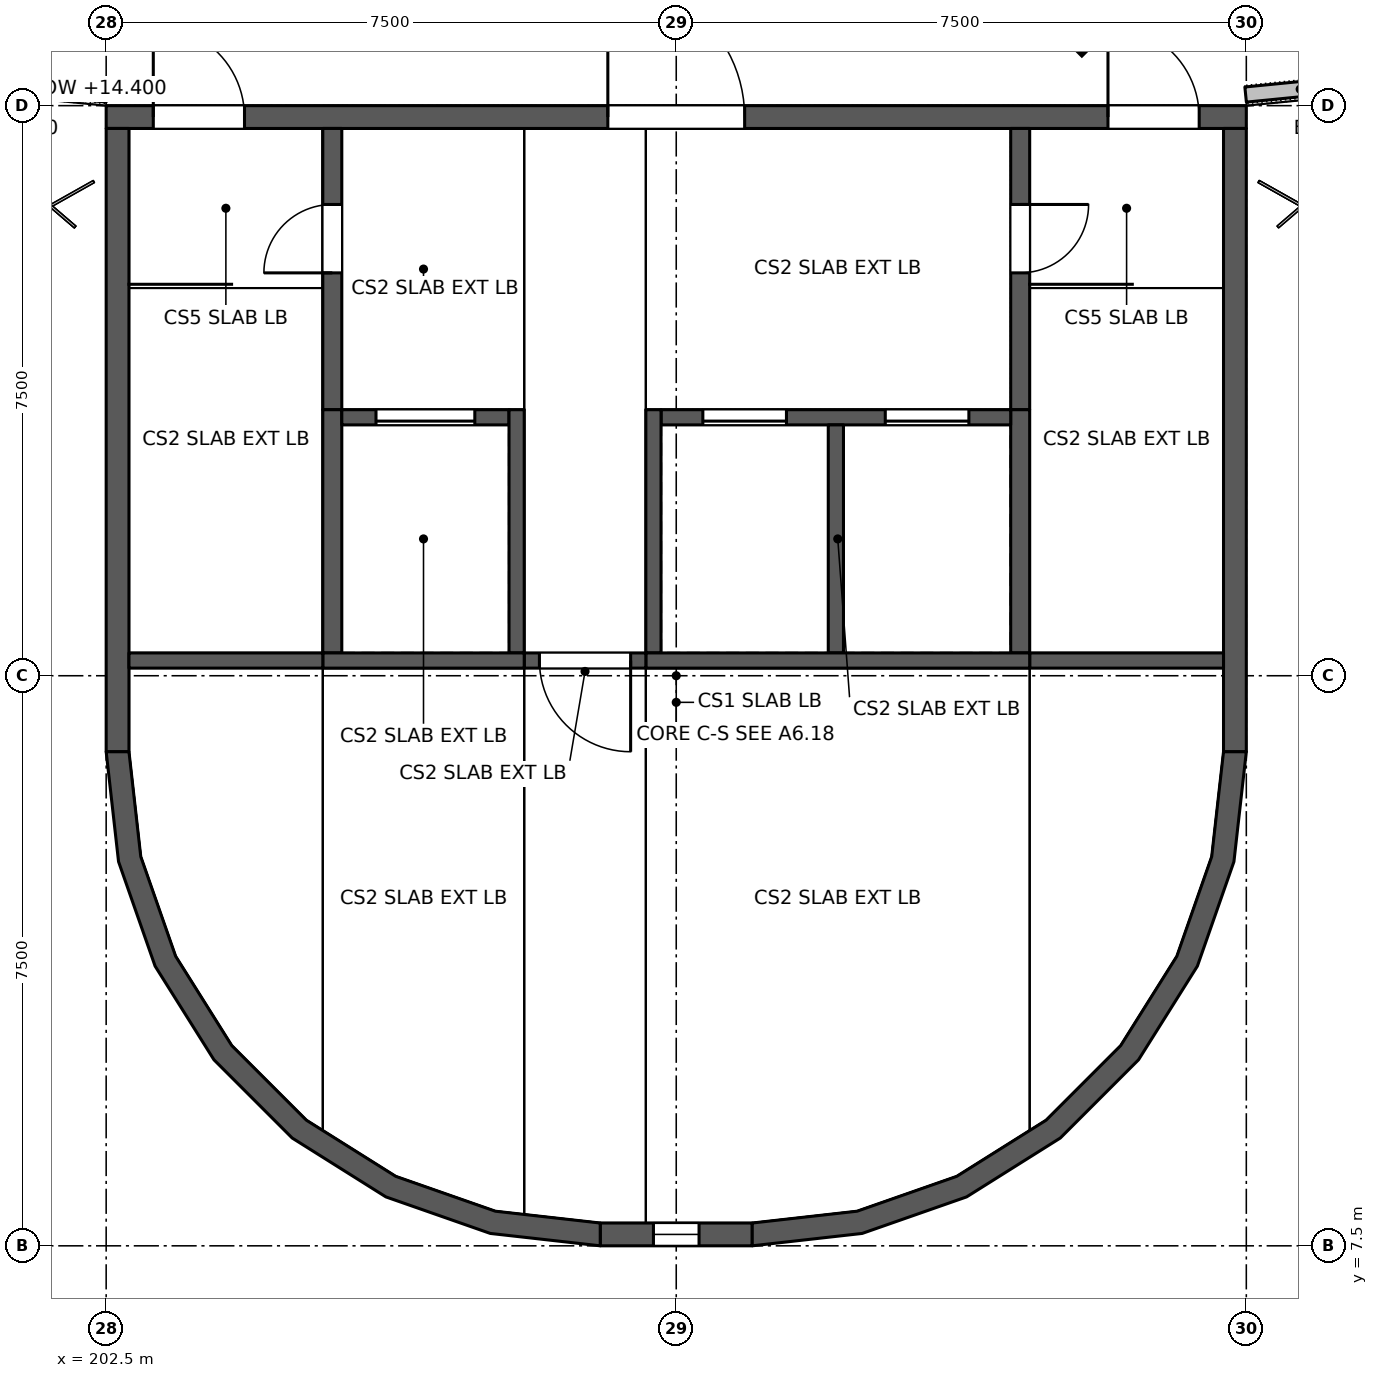
"""IFC4 building model, lengths in metres.
Left out: names, types, materials, properties, quantities, classifications, styles, units other than length and angle.
Written with IfcOpenShell. Run it as: python <this file> out.ifc"""

import sys

from ifc_helpers import new_model, si_unit, direction, frame, frame_2d, origin, place, context, subcontext, project, spatial, polyline, rectangle, outline, extrude, element, fill, save


model = new_model("IFC4")
c1 = context("Model", 3, precision=1e-05, world=origin(), true_north=direction((0.0, 1.0)))
c2 = subcontext(c1, "Body", "Model", "MODEL_VIEW")
j1 = project(units=[si_unit("LENGTHUNIT", "METRE"), si_unit("PLANEANGLEUNIT", "RADIAN")], contexts=[c1])
p1 = place(None, origin())
s1 = spatial("IfcSite", under=j1, at=p1, CompositionType="ELEMENT")
p2 = place(p1, origin())
s2 = spatial("IfcBuilding", under=s1, at=p2, CompositionType="ELEMENT")
p3 = place(p2, frame((0.0, 0.0, 13.2)))
s3 = spatial("IfcBuildingStorey", under=s2, at=p3, CompositionType="ELEMENT", Elevation=13.2)
for number, where, z_axis, x_axis in (
    (1, (201.074, 22.788, 0.0), (0.0, 0.0, 1.0), (0.995, -0.098, 0.0)),
    (2, (217.491, 22.646, 0.0), (0.0, 0.0, 1.0), (0.995, 0.099, 0.0)),
):
    element("IfcWall", number, at=place(p3, frame(where, z_axis=z_axis, x_axis=x_axis)), inside=s3, PredefinedType="SOLIDWALL", context=c2, shape_type="SweptSolid", body=[
        extrude(rectangle(XDim=1.443, YDim=0.2, at=frame_2d((0.721, 0.0))), origin(), (0.0, 0.0, 1.0), 1.2),
    ])
p4 = place(p3, frame((202.5, 22.35, 0.0), z_axis=(0.0, 0.0, 1.0), x_axis=(1.0, 0.0, 0.0)))
e3 = element("IfcWall", 3, at=p4, inside=s3, PredefinedType="SHEAR", context=c2, shape_type="SweptSolid", body=[
    extrude(rectangle(XDim=15.0, YDim=0.3, at=frame_2d((7.5, 0.0))), origin(), (0.0, 0.0, 1.0), 3.3),
])
p5 = place(p4, frame((13.18, 0.0, 0.0)))
e4 = element("IfcOpeningElement", 4, at=p5, cuts=e3, PredefinedType="OPENING", context=c2, shape_type="SweptSolid", body=[
    extrude(rectangle(XDim=1.2, YDim=2.1, at=frame_2d((0.6, 1.05))), frame((0.0, 0.16, 0.0), z_axis=(0.0, -1.0, 0.0), x_axis=(1.0, 0.0, 0.0)), (0.0, 0.0, 1.0), 0.32),
])
p6 = place(p4, frame((0.62, 0.0, 0.0)))
e5 = element("IfcOpeningElement", 5, at=p6, cuts=e3, PredefinedType="OPENING", context=c2, shape_type="SweptSolid", body=[
    extrude(rectangle(XDim=1.2, YDim=2.1, at=frame_2d((0.6, 1.05))), frame((0.0, 0.16, 0.0), z_axis=(0.0, -1.0, 0.0), x_axis=(1.0, 0.0, 0.0)), (0.0, 0.0, 1.0), 0.32),
])
p7 = place(p4, frame((6.6, 0.0, 0.0)))
e6 = element("IfcOpeningElement", 6, at=p7, cuts=e3, PredefinedType="OPENING", context=c2, shape_type="SweptSolid", body=[
    extrude(rectangle(XDim=1.8, YDim=2.1, at=frame_2d((0.9, 1.05))), frame((0.0, 0.16, 0.0), z_axis=(0.0, -1.0, 0.0), x_axis=(1.0, 0.0, 0.0)), (0.0, 0.0, 1.0), 0.32),
])
p8 = place(p3, frame((211.0, 7.65, 0.0), z_axis=(0.0, 0.0, 1.0), x_axis=(-1.0, 0.0, 0.0)))
e7 = element("IfcWall", 7, at=p8, inside=s3, PredefinedType="SHEAR", context=c2, shape_type="SweptSolid", body=[
    extrude(rectangle(XDim=2.0, YDim=0.3, at=frame_2d((1.0, 0.0))), origin(), (0.0, 0.0, 1.0), 4.5),
])
p9 = place(p8, frame((0.7, 0.0, 0.3)))
e8 = element("IfcOpeningElement", 8, at=p9, cuts=e7, PredefinedType="OPENING", context=c2, shape_type="SweptSolid", body=[
    extrude(rectangle(XDim=0.6, YDim=2.7, at=frame_2d((0.3, 1.35))), frame((0.0, 0.16, 0.0), z_axis=(0.0, -1.0, 0.0), x_axis=(1.0, 0.0, 0.0)), (0.0, 0.0, 1.0), 0.32),
])
p10 = place(p3, frame((217.35, 22.2, 0.0), z_axis=(0.0, 0.0, 1.0), x_axis=(0.0, -1.0, 0.0)))
e9 = element("IfcWall", 9, at=p10, inside=s3, PredefinedType="SHEAR", context=c2, shape_type="SweptSolid", body=[
    extrude(outline(polyline([(0.0, 0.0), (8.2, 0.0), (8.2, 3.983), (0.0, 3.3), (0.0, 0.0)])), frame((0.0, 0.15, 0.0), z_axis=(0.0, -1.0, 0.0), x_axis=(1.0, 0.0, 0.0)), (0.0, 0.0, 1.0), 0.3),
])
p11 = place(p3, frame((202.65, 14.0, 0.0), z_axis=(0.0, 0.0, 1.0), x_axis=(0.0, 1.0, 0.0)))
e10 = element("IfcWall", 10, at=p11, inside=s3, PredefinedType="SHEAR", context=c2, shape_type="SweptSolid", body=[
    extrude(outline(polyline([(0.0, 0.0), (8.2, 0.0), (8.2, 3.3), (0.0, 3.983), (0.0, 0.0)])), frame((0.0, 0.15, 0.0), z_axis=(0.0, -1.0, 0.0), x_axis=(1.0, 0.0, 0.0)), (0.0, 0.0, 1.0), 0.3),
])
p12 = place(p3, frame((214.525, 22.2, 0.0), z_axis=(0.0, 0.0, 1.0), x_axis=(0.0, -1.0, 0.0)))
e11 = element("IfcWall", 11, at=p12, inside=s3, PredefinedType="STANDARD", context=c2, shape_type="SweptSolid", body=[
    extrude(outline(polyline([(0.0, 0.0), (3.7, 0.0), (3.7, 3.408), (0.0, 3.1), (0.0, 0.0)])), frame((0.0, 0.125, 0.0), z_axis=(0.0, -1.0, 0.0), x_axis=(1.0, 0.0, 0.0)), (0.0, 0.0, 1.0), 0.25),
])
p13 = place(p12, frame((1.0, 0.0, 0.0)))
e12 = element("IfcOpeningElement", 12, at=p13, cuts=e11, PredefinedType="OPENING", context=c2, shape_type="SweptSolid", body=[
    extrude(rectangle(XDim=0.9, YDim=2.1, at=frame_2d((0.45, 1.05))), frame((0.0, 0.135, 0.0), z_axis=(0.0, -1.0, 0.0), x_axis=(1.0, 0.0, 0.0)), (0.0, 0.0, 1.0), 0.27),
])
p14 = place(p3, frame((214.525, 18.5, 0.0), z_axis=(0.0, 0.0, 1.0), x_axis=(0.0, -1.0, 0.0)))
e13 = element("IfcWall", 13, at=p14, inside=s3, PredefinedType="STANDARD", context=c2, shape_type="SweptSolid", body=[
    extrude(rectangle(XDim=3.2, YDim=0.25, at=frame_2d((1.6, 0.0))), origin(), (0.0, 0.0, 1.0), 7.652),
])
p15 = place(p3, frame((205.475, 18.5, 0.0), z_axis=(0.0, 0.0, 1.0), x_axis=(0.0, 1.0, 0.0)))
e14 = element("IfcWall", 14, at=p15, inside=s3, PredefinedType="STANDARD", context=c2, shape_type="SweptSolid", body=[
    extrude(outline(polyline([(0.0, 0.0), (3.7, 0.0), (3.7, 3.1), (0.0, 3.408), (0.0, 0.0)])), frame((0.0, 0.125, 0.0), z_axis=(0.0, -1.0, 0.0), x_axis=(1.0, 0.0, 0.0)), (0.0, 0.0, 1.0), 0.25),
])
p16 = place(p15, frame((1.8, 0.0, 0.0)))
e15 = element("IfcOpeningElement", 15, at=p16, cuts=e14, PredefinedType="OPENING", context=c2, shape_type="SweptSolid", body=[
    extrude(rectangle(XDim=0.9, YDim=2.1, at=frame_2d((0.45, 1.05))), frame((0.0, 0.135, 0.0), z_axis=(0.0, -1.0, 0.0), x_axis=(1.0, 0.0, 0.0)), (0.0, 0.0, 1.0), 0.27),
])
p17 = place(p3, frame((205.475, 18.5, 0.0), z_axis=(0.0, 0.0, 1.0), x_axis=(0.0, -1.0, 0.0)))
e16 = element("IfcWall", 16, at=p17, inside=s3, PredefinedType="STANDARD", context=c2, shape_type="SweptSolid", body=[
    extrude(rectangle(XDim=3.2, YDim=0.25, at=frame_2d((1.6, 0.0))), origin(), (0.0, 0.0, 1.0), 4.8),
])
p18 = place(p3, frame((214.4, 18.4, 0.0), z_axis=(0.0, 0.0, 1.0), x_axis=(-1.0, 0.0, 0.0)))
e17 = element("IfcWall", 17, at=p18, inside=s3, PredefinedType="STANDARD", context=c2, shape_type="SweptSolid", body=[
    extrude(outline(polyline([(0.0, 0.0), (4.6, 0.0), (4.6, 4.919), (0.0, 7.652), (0.0, 0.0)])), frame((0.0, 0.1, 0.0), z_axis=(0.0, -1.0, 0.0), x_axis=(1.0, 0.0, 0.0)), (0.0, 0.0, 1.0), 0.2),
])
p19 = place(p18, frame((0.55, 0.0, 0.0)))
e18 = element("IfcOpeningElement", 18, at=p19, cuts=e17, PredefinedType="OPENING", context=c2, shape_type="SweptSolid", body=[
    extrude(rectangle(XDim=1.1, YDim=2.1, at=frame_2d((0.55, 1.05))), frame((0.0, 0.11, 0.0), z_axis=(0.0, -1.0, 0.0), x_axis=(1.0, 0.0, 0.0)), (0.0, 0.0, 1.0), 0.22),
])
p20 = place(p18, frame((2.95, 0.0, 0.0)))
e19 = element("IfcOpeningElement", 19, at=p20, cuts=e17, PredefinedType="OPENING", context=c2, shape_type="SweptSolid", body=[
    extrude(rectangle(XDim=1.1, YDim=2.1, at=frame_2d((0.55, 1.05))), frame((0.0, 0.11, 0.0), z_axis=(0.0, -1.0, 0.0), x_axis=(1.0, 0.0, 0.0)), (0.0, 0.0, 1.0), 0.22),
])
p21 = place(p3, frame((207.8, 18.4, 0.0), z_axis=(0.0, 0.0, 1.0), x_axis=(-1.0, 0.0, 0.0)))
e20 = element("IfcWall", 20, at=p21, inside=s3, PredefinedType="STANDARD", context=c2, shape_type="SweptSolid", body=[
    extrude(outline(polyline([(0.0, 0.0), (2.2, 0.0), (2.2, 5.083), (0.0, 7.574), (0.0, 0.0)])), frame((0.0, 0.1, 0.0), z_axis=(0.0, -1.0, 0.0), x_axis=(1.0, 0.0, 0.0)), (0.0, 0.0, 1.0), 0.2),
])
p22 = place(p21, frame((0.45, 0.0, 0.0)))
e21 = element("IfcOpeningElement", 21, at=p22, cuts=e20, PredefinedType="OPENING", context=c2, shape_type="SweptSolid", body=[
    extrude(rectangle(XDim=1.3, YDim=2.1, at=frame_2d((0.65, 1.05))), frame((0.0, 0.11, 0.0), z_axis=(0.0, -1.0, 0.0), x_axis=(1.0, 0.0, 0.0)), (0.0, 0.0, 1.0), 0.22),
])
p23 = place(p3, frame((212.1, 18.3, 0.0), z_axis=(0.0, 0.0, 1.0), x_axis=(0.0, -1.0, 0.0)))
e22 = element("IfcWall", 22, at=p23, inside=s3, PredefinedType="STANDARD", context=c2, shape_type="SweptSolid", body=[
    extrude(rectangle(XDim=3.0, YDim=0.2, at=frame_2d((1.5, 0.0))), origin(), (0.0, 0.0, 1.0), 6.226),
])
p24 = place(p3, frame((209.7, 18.5, 0.0), z_axis=(0.0, 0.0, 1.0), x_axis=(0.0, -1.0, 0.0)))
e23 = element("IfcWall", 23, at=p24, inside=s3, PredefinedType="STANDARD", context=c2, shape_type="SweptSolid", body=[
    extrude(rectangle(XDim=3.2, YDim=0.2, at=frame_2d((1.6, 0.0))), origin(), (0.0, 0.0, 1.0), 4.8),
])
p25 = place(p3, frame((207.9, 18.5, 0.0), z_axis=(0.0, 0.0, 1.0), x_axis=(0.0, -1.0, 0.0)))
e24 = element("IfcWall", 24, at=p25, inside=s3, PredefinedType="STANDARD", context=c2, shape_type="SweptSolid", body=[
    extrude(rectangle(XDim=3.2, YDim=0.2, at=frame_2d((1.6, 0.0))), origin(), (0.0, 0.0, 1.0), 7.574),
])
p26 = place(p3, frame((217.2, 15.2, 0.0), z_axis=(0.0, 0.0, 1.0), x_axis=(-1.0, 0.0, 0.0)))
e25 = element("IfcWall", 25, at=p26, inside=s3, PredefinedType="STANDARD", context=c2, shape_type="SweptSolid", body=[
    extrude(rectangle(XDim=2.55, YDim=0.2, at=frame_2d((1.275, 0.0))), origin(), (0.0, 0.0, 1.0), 3.683),
])
p27 = place(p3, frame((214.65, 15.2, 0.0), z_axis=(0.0, 0.0, 1.0), x_axis=(-1.0, 0.0, 0.0)))
e26 = element("IfcWall", 26, at=p27, inside=s3, PredefinedType="STANDARD", context=c2, shape_type="SweptSolid", body=[
    extrude(outline(polyline([(0.0, 0.0), (5.05, 0.0), (5.05, 4.8), (0.0, 7.8), (0.0, 0.0)])), frame((0.0, 0.1, 0.0), z_axis=(0.0, -1.0, 0.0), x_axis=(1.0, 0.0, 0.0)), (0.0, 0.0, 1.0), 0.2),
])
p28 = place(p3, frame((209.6, 15.2, 0.0), z_axis=(0.0, 0.0, 1.0), x_axis=(-1.0, 0.0, 0.0)))
e27 = element("IfcWall", 27, at=p28, inside=s3, PredefinedType="STANDARD", context=c2, shape_type="SweptSolid", body=[
    extrude(rectangle(XDim=1.6, YDim=0.2, at=frame_2d((0.8, 0.0))), origin(), (0.0, 0.0, 1.0), 3.683),
])
p29 = place(p28, frame((0.2, 0.0, 0.0)))
e28 = element("IfcOpeningElement", 28, at=p29, cuts=e27, PredefinedType="OPENING", context=c2, shape_type="SweptSolid", body=[
    extrude(rectangle(XDim=1.2, YDim=2.1, at=frame_2d((0.6, 1.05))), frame((0.0, 0.11, 0.0), z_axis=(0.0, -1.0, 0.0), x_axis=(1.0, 0.0, 0.0)), (0.0, 0.0, 1.0), 0.22),
])
p30 = place(p3, frame((208.0, 15.2, 0.0), z_axis=(0.0, 0.0, 1.0), x_axis=(-1.0, 0.0, 0.0)))
e29 = element("IfcWall", 29, at=p30, inside=s3, PredefinedType="STANDARD", context=c2, shape_type="SweptSolid", body=[
    extrude(outline(polyline([(0.0, 0.0), (2.65, 0.0), (2.65, 4.8), (0.0, 7.8), (0.0, 0.0)])), frame((0.0, 0.1, 0.0), z_axis=(0.0, -1.0, 0.0), x_axis=(1.0, 0.0, 0.0)), (0.0, 0.0, 1.0), 0.2),
])
p31 = place(p3, frame((205.35, 15.2, 0.0), z_axis=(0.0, 0.0, 1.0), x_axis=(-1.0, 0.0, 0.0)))
e30 = element("IfcWall", 30, at=p31, inside=s3, PredefinedType="STANDARD", context=c2, shape_type="SweptSolid", body=[
    extrude(rectangle(XDim=2.55, YDim=0.2, at=frame_2d((1.275, 0.0))), origin(), (0.0, 0.0, 1.0), 3.683),
])
p32 = place(p3, origin())
e31 = element("IfcWall", 31, at=p32, inside=s3, PredefinedType="SHEAR", context=c2, shape_type="SweptSolid", body=[
    extrude(outline(polyline([(217.5, 14.0), (217.337, 12.554), (216.856, 11.18), (216.082, 9.947), (215.053, 8.918), (213.82, 8.144), (212.446, 7.663), (211.0, 7.5), (211.0, 7.8), (212.38, 7.955), (213.69, 8.414), (214.865, 9.153), (215.847, 10.135), (216.586, 11.31), (217.045, 12.62), (217.2, 14.0), (217.5, 14.0)])), origin(), (0.0, 0.0, 1.0), 4.5),
])
p33 = place(p3, origin())
e32 = element("IfcWall", 32, at=p33, inside=s3, PredefinedType="SHEAR", context=c2, shape_type="SweptSolid", body=[
    extrude(outline(polyline([(202.5, 14.0), (202.663, 12.554), (203.144, 11.18), (203.918, 9.947), (204.947, 8.918), (206.18, 8.144), (207.554, 7.663), (209.0, 7.5), (209.0, 7.8), (207.62, 7.955), (206.31, 8.414), (205.135, 9.153), (204.153, 10.135), (203.414, 11.31), (202.955, 12.62), (202.8, 14.0), (202.5, 14.0)])), origin(), (0.0, 0.0, 1.0), 4.5),
])
p34 = place(p5, origin())
e33 = element("IfcDoor", 33, at=p34, inside=s3, OperationType="SINGLE_SWING_RIGHT", PredefinedType="DOOR", context=c2, shape_type="SweptSolid", body=[
    extrude(rectangle(XDim=1.2, YDim=2.1, at=frame_2d((0.6, 1.05))), frame((0.0, 0.025, 0.0), z_axis=(0.0, -1.0, 0.0), x_axis=(1.0, 0.0, 0.0)), (0.0, 0.0, 1.0), 0.05),
])
fill(e4, e33)
p35 = place(p6, origin())
e34 = element("IfcDoor", 34, at=p35, inside=s3, OperationType="SINGLE_SWING_LEFT", PredefinedType="DOOR", context=c2, shape_type="SweptSolid", body=[
    extrude(rectangle(XDim=1.2, YDim=2.1, at=frame_2d((0.6, 1.05))), frame((0.0, 0.025, 0.0), z_axis=(0.0, -1.0, 0.0), x_axis=(1.0, 0.0, 0.0)), (0.0, 0.0, 1.0), 0.05),
])
fill(e5, e34)
p36 = place(p7, origin())
e35 = element("IfcDoor", 35, at=p36, inside=s3, OperationType="DOUBLE_DOOR_SINGLE_SWING", PredefinedType="DOOR", context=c2, shape_type="SweptSolid", body=[
    extrude(rectangle(XDim=1.8, YDim=2.1, at=frame_2d((0.9, 1.05))), frame((0.0, 0.025, 0.0), z_axis=(0.0, -1.0, 0.0), x_axis=(1.0, 0.0, 0.0)), (0.0, 0.0, 1.0), 0.05),
])
fill(e6, e35)
p37 = place(p13, origin())
e36 = element("IfcDoor", 36, at=p37, inside=s3, OperationType="SINGLE_SWING_LEFT", PredefinedType="DOOR", context=c2, shape_type="SweptSolid", body=[
    extrude(rectangle(XDim=0.9, YDim=2.1, at=frame_2d((0.45, 1.05))), frame((0.0, 0.025, 0.0), z_axis=(0.0, -1.0, 0.0), x_axis=(1.0, 0.0, 0.0)), (0.0, 0.0, 1.0), 0.05),
])
fill(e12, e36)
p38 = place(p16, origin())
e37 = element("IfcDoor", 37, at=p38, inside=s3, OperationType="SINGLE_SWING_RIGHT", PredefinedType="DOOR", context=c2, shape_type="SweptSolid", body=[
    extrude(rectangle(XDim=0.9, YDim=2.1, at=frame_2d((0.45, 1.05))), frame((0.0, 0.025, 0.0), z_axis=(0.0, -1.0, 0.0), x_axis=(1.0, 0.0, 0.0)), (0.0, 0.0, 1.0), 0.05),
])
fill(e15, e37)
p39 = place(p19, origin())
e38 = element("IfcDoor", 38, at=p39, inside=s3, OperationType="DOUBLE_DOOR_SLIDING", PredefinedType="DOOR", context=c2, shape_type="SweptSolid", body=[
    extrude(rectangle(XDim=1.1, YDim=2.1, at=frame_2d((0.55, 1.05))), frame((0.0, 0.025, 0.0), z_axis=(0.0, -1.0, 0.0), x_axis=(1.0, 0.0, 0.0)), (0.0, 0.0, 1.0), 0.05),
])
fill(e18, e38)
p40 = place(p20, origin())
e39 = element("IfcDoor", 39, at=p40, inside=s3, OperationType="DOUBLE_DOOR_SLIDING", PredefinedType="DOOR", context=c2, shape_type="SweptSolid", body=[
    extrude(rectangle(XDim=1.1, YDim=2.1, at=frame_2d((0.55, 1.05))), frame((0.0, 0.025, 0.0), z_axis=(0.0, -1.0, 0.0), x_axis=(1.0, 0.0, 0.0)), (0.0, 0.0, 1.0), 0.05),
])
fill(e19, e39)
p41 = place(p22, origin())
e40 = element("IfcDoor", 40, at=p41, inside=s3, OperationType="DOUBLE_DOOR_SLIDING", PredefinedType="DOOR", context=c2, shape_type="SweptSolid", body=[
    extrude(rectangle(XDim=1.3, YDim=2.1, at=frame_2d((0.65, 1.05))), frame((0.0, 0.025, 0.0), z_axis=(0.0, -1.0, 0.0), x_axis=(1.0, 0.0, 0.0)), (0.0, 0.0, 1.0), 0.05),
])
fill(e21, e40)
p42 = place(p29, origin())
e41 = element("IfcDoor", 41, at=p42, inside=s3, OperationType="SINGLE_SWING_RIGHT", PredefinedType="DOOR", context=c2, shape_type="SweptSolid", body=[
    extrude(rectangle(XDim=1.2, YDim=2.1, at=frame_2d((0.6, 1.05))), frame((0.0, 0.025, 0.0), z_axis=(0.0, -1.0, 0.0), x_axis=(1.0, 0.0, 0.0)), (0.0, 0.0, 1.0), 0.05),
])
fill(e28, e41)
p43 = place(p9, origin())
e42 = element("IfcWindow", 42, at=p43, inside=s3, PartitioningType="SINGLE_PANEL", PredefinedType="WINDOW", context=c2, shape_type="SweptSolid", body=[
    extrude(rectangle(XDim=0.6, YDim=2.7, at=frame_2d((0.3, 1.35))), frame((0.0, 0.03, 0.0), z_axis=(0.0, -1.0, 0.0), x_axis=(1.0, 0.0, 0.0)), (0.0, 0.0, 1.0), 0.06),
])
fill(e8, e42)
save(model, sys.argv[1])
